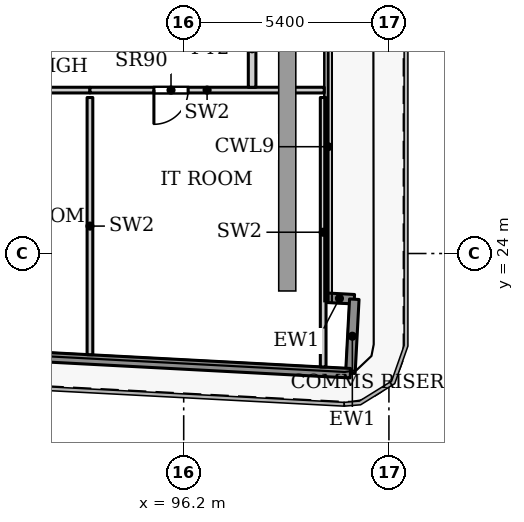
"""IFC4 building model, lengths in metres.
Left out: names, types, materials, properties, quantities, classifications, styles, units other than length and angle.
Written with IfcOpenShell. Run it as: python <this file> out.ifc"""

import sys

from ifc_helpers import new_model, si_unit, direction, frame, frame_2d, origin, place, context, subcontext, project, spatial, rectangle, extrude, source, transform, mapped, element, fill, save


model = new_model("IFC4")
c1 = context("Model", 3, precision=1e-05, world=origin(), true_north=direction((0.0, 1.0)))
c2 = subcontext(c1, "Body", "Model", "MODEL_VIEW")
j1 = project(units=[si_unit("LENGTHUNIT", "METRE"), si_unit("PLANEANGLEUNIT", "RADIAN")], contexts=[c1])
p1 = place(None, origin())
s1 = spatial("IfcSite", under=j1, at=p1, CompositionType="ELEMENT")
p2 = place(p1, origin())
s2 = spatial("IfcBuilding", under=s1, at=p2, CompositionType="ELEMENT")
p3 = place(p2, frame((0.0, 0.0, 105.8)))
s3 = spatial("IfcBuildingStorey", under=s2, at=p3, CompositionType="ELEMENT", Elevation=105.8)
p4 = place(p3, frame((99.907, 22.839, 0.0), z_axis=(0.0, 0.0, 1.0), x_axis=(0.998561284263, -0.053622398031, 0.0)))
e1 = element("IfcWall", 1, at=p4, inside=s3, PredefinedType="SOLIDWALL", context=c2, shape_type="SweptSolid", body=[
    extrude(rectangle(XDim=0.783, YDim=0.25, at=frame_2d((0.392, 0.0))), origin(), (0.0, 0.0, 1.0), 3.75),
])
p5 = place(p3, frame((100.689, 22.797, 0.0), z_axis=(0.0, 0.0, 1.0), x_axis=(-0.052841433274, -0.998602915542, 0.0)))
e2 = element("IfcWall", 2, at=p5, inside=s3, PredefinedType="SOLIDWALL", context=c2, shape_type="SweptSolid", body=[
    extrude(rectangle(XDim=1.95, YDim=0.25, at=frame_2d((0.975, 0.0))), origin(), (0.0, 0.0, 1.0), 3.75),
])
p6 = place(p3, frame((100.586, 20.85, 0.0), z_axis=(0.0, 0.0, 1.0), x_axis=(-0.99861746497, 0.052565755559, 0.0)))
e3 = element("IfcWall", 3, at=p6, inside=s3, PredefinedType="SOLIDWALL", context=c2, shape_type="SweptSolid", body=[
    extrude(rectangle(XDim=66.639, YDim=0.25, at=frame_2d((33.319, 0.0))), origin(), (0.0, 0.0, 1.0), 3.75),
])
p7 = place(p3, frame((89.32, 28.3, 0.0), z_axis=(0.0, 0.0, 1.0), x_axis=(1.0, 0.0, 0.0)))
e4 = element("IfcWall", 4, at=p7, inside=s3, PredefinedType="PARTITIONING", context=c2, shape_type="SweptSolid", body=[
    extrude(rectangle(XDim=4.413, YDim=0.15, at=frame_2d((2.207, 0.0))), origin(), (0.0, 0.0, 1.0), 2.5),
])
p8 = place(p7, frame((1.756, 0.0, 0.0)))
e5 = element("IfcOpeningElement", 5, at=p8, cuts=e4, PredefinedType="OPENING", context=c2, shape_type="SweptSolid", body=[
    extrude(rectangle(XDim=0.9, YDim=2.2, at=frame_2d((0.45, 1.1))), frame((0.0, 0.085, 0.0), z_axis=(0.0, -1.0, 0.0), x_axis=(1.0, 0.0, 0.0)), (0.0, 0.0, 1.0), 0.17),
])
p9 = place(p3, frame((93.733, 21.338, 0.0), z_axis=(0.0, 0.0, 1.0), x_axis=(0.0, 1.0, 0.0)))
e6 = element("IfcWall", 6, at=p9, inside=s3, PredefinedType="PARTITIONING", context=c2, shape_type="SweptSolid", body=[
    extrude(rectangle(XDim=6.767, YDim=0.15, at=frame_2d((3.384, 0.0))), origin(), (0.0, 0.0, 1.0), 3.9),
])
p10 = place(p3, frame((93.733, 28.3, 0.0), z_axis=(0.0, 0.0, 1.0), x_axis=(1.0, 0.0, 0.0)))
e7 = element("IfcWall", 7, at=p10, inside=s3, PredefinedType="PARTITIONING", context=c2, shape_type="SweptSolid", body=[
    extrude(rectangle(XDim=6.165, YDim=0.15, at=frame_2d((3.083, 0.0))), origin(), (0.0, 0.0, 1.0), 3.9),
])
p11 = place(p10, frame((1.683, 0.0, 0.0)))
e8 = element("IfcOpeningElement", 8, at=p11, cuts=e7, PredefinedType="OPENING", context=c2, shape_type="SweptSolid", body=[
    extrude(rectangle(XDim=0.9, YDim=2.2, at=frame_2d((0.45, 1.1))), frame((0.0, 0.085, 0.0), z_axis=(0.0, -1.0, 0.0), x_axis=(1.0, 0.0, 0.0)), (0.0, 0.0, 1.0), 0.17),
])
p12 = place(p3, frame((99.87, 21.015, 0.0), z_axis=(0.0, 0.0, 1.0), x_axis=(0.0, 1.0, 0.0)))
e9 = element("IfcWall", 9, at=p12, inside=s3, PredefinedType="PARTITIONING", context=c2, shape_type="SweptSolid", body=[
    extrude(rectangle(XDim=7.09, YDim=0.15, at=frame_2d((3.545, 0.0))), origin(), (0.0, 0.0, 1.0), 3.9),
])
p13 = place(p3, frame((98.0, 28.374, 0.0), z_axis=(0.0, 0.0, 1.0), x_axis=(0.0, 1.0, 0.0)))
e10 = element("IfcWall", 10, at=p13, inside=s3, PredefinedType="PARTITIONING", context=c2, shape_type="SweptSolid", body=[
    extrude(rectangle(XDim=2.026, YDim=0.2, at=frame_2d((1.013, 0.0))), origin(), (0.0, 0.0, 1.0), 3.6),
])
m1 = source(origin(), c2, "Body", "SweptSolid", [
    extrude(rectangle(XDim=0.9, YDim=2.2, at=frame_2d((0.45, 1.1))), frame((0.0, 0.025, 0.0), z_axis=(0.0, -1.0, 0.0), x_axis=(1.0, 0.0, 0.0)), (0.0, 0.0, 1.0), 0.05),
])
p14 = place(p11, origin())
e11 = element("IfcDoor", 11, at=p14, inside=s3, OperationType="SINGLE_SWING_RIGHT", PredefinedType="DOOR", context=c2, shape_type="MappedRepresentation", body=[
    mapped(m1, transform((0.0, 0.0, 0.0), x_axis=(1.0, 0.0, 0.0), y_axis=(0.0, 1.0, 0.0), z_axis=(0.0, 0.0, 1.0), scale=1.0)),
])
fill(e8, e11)
save(model, sys.argv[1])
